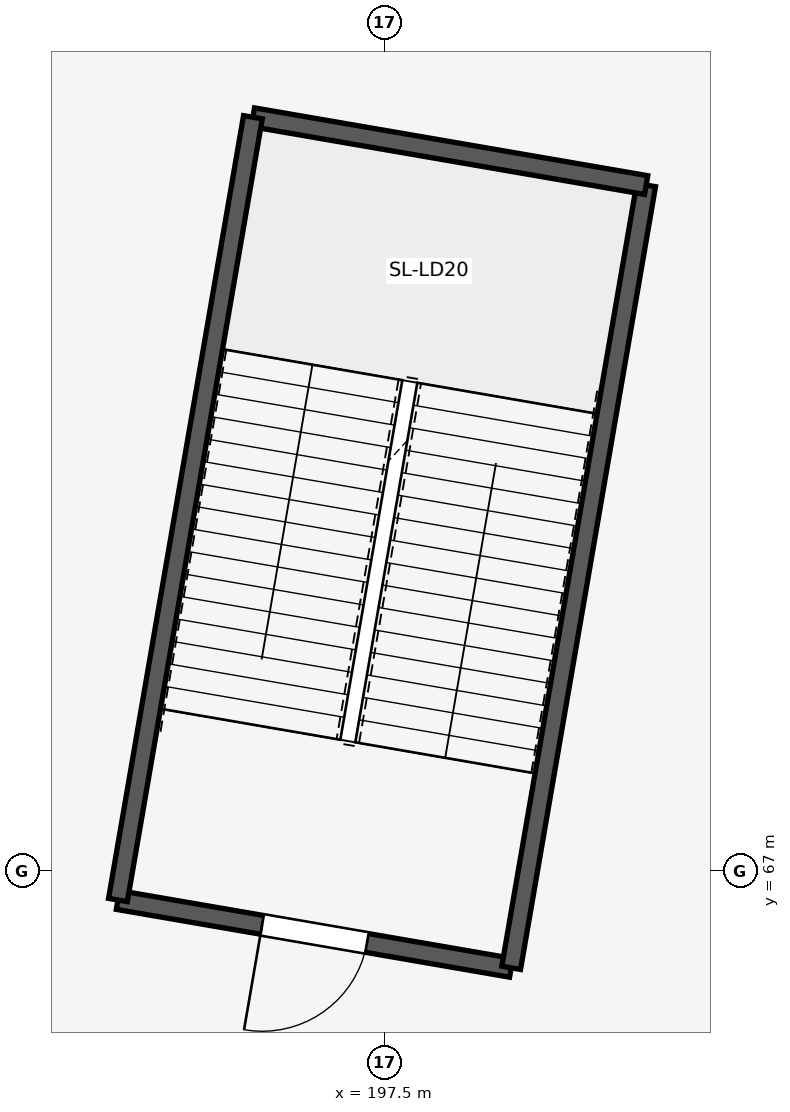
"""IFC4 building model, lengths in metres.
Left out: names, types, materials, properties, quantities, classifications, styles, units other than length and angle.
Written with IfcOpenShell. Run it as: python <this file> out.ifc"""

import sys

from ifc_helpers import new_model, si_unit, direction, frame, frame_2d, origin, place, context, subcontext, project, spatial, rectangle, extrude, element, fill, save


model = new_model("IFC4")
c1 = context("Model", 3, precision=1e-05, world=origin(), true_north=direction((0.0, 1.0)))
c2 = subcontext(c1, "Body", "Model", "MODEL_VIEW")
j1 = project(units=[si_unit("LENGTHUNIT", "METRE"), si_unit("PLANEANGLEUNIT", "RADIAN")], contexts=[c1])
p1 = place(None, origin())
s1 = spatial("IfcSite", under=j1, at=p1, CompositionType="ELEMENT")
p2 = place(p1, origin())
s2 = spatial("IfcBuilding", under=s1, at=p2, CompositionType="ELEMENT")
p3 = place(p2, origin())
s3 = spatial("IfcBuildingStorey", under=s2, at=p3, CompositionType="ELEMENT", Elevation=0.0)
p4 = place(p3, frame((193.987, 66.625, 0.0), z_axis=(0.0, 0.0, 1.0), x_axis=(0.985457162135, -0.16992404655, 0.0)))
e1 = element("IfcWall", 1, at=p4, inside=s3, PredefinedType="SHEAR", context=c2, shape_type="SweptSolid", body=[
    extrude(rectangle(XDim=5.25, YDim=0.25, at=frame_2d((2.625, 0.0))), origin(), (0.0, 0.0, 1.0), 4.94),
])
p5 = place(p4, frame((1.925, 0.0, 0.0)))
e2 = element("IfcOpeningElement", 2, at=p5, cuts=e1, PredefinedType="OPENING", context=c2, shape_type="SweptSolid", body=[
    extrude(rectangle(XDim=1.4, YDim=2.2, at=frame_2d((0.7, 1.1))), frame((0.0, 0.135, 0.0), z_axis=(0.0, -1.0, 0.0), x_axis=(1.0, 0.0, 0.0)), (0.0, 0.0, 1.0), 0.27),
])
p6 = place(p3, frame((199.16, 65.733, 0.0), z_axis=(0.0, 0.0, 1.0), x_axis=(0.169938992676, 0.985454584833, 0.0)))
e3 = element("IfcWall", 3, at=p6, inside=s3, PredefinedType="SHEAR", context=c2, shape_type="SweptSolid", body=[
    extrude(rectangle(XDim=10.45, YDim=0.25, at=frame_2d((5.225, 0.0))), origin(), (0.0, 0.0, 1.0), 4.94),
])
p7 = place(p3, frame((200.936, 76.031, 0.0), z_axis=(0.0, 0.0, 1.0), x_axis=(-0.985458504796, 0.169916259745, 0.0)))
e4 = element("IfcWall", 4, at=p7, inside=s3, PredefinedType="SHEAR", context=c2, shape_type="SweptSolid", body=[
    extrude(rectangle(XDim=5.25, YDim=0.25, at=frame_2d((2.625, 0.0))), origin(), (0.0, 0.0, 1.0), 4.94),
])
p8 = place(p3, frame((195.762, 76.923, 0.0), z_axis=(0.0, 0.0, 1.0), x_axis=(-0.16991630471, -0.985458497043, 0.0)))
e5 = element("IfcWall", 5, at=p8, inside=s3, PredefinedType="SHEAR", context=c2, shape_type="SweptSolid", body=[
    extrude(rectangle(XDim=10.45, YDim=0.25, at=frame_2d((5.225, 0.0))), origin(), (0.0, 0.0, 1.0), 4.94),
])
p9 = place(p5, frame((1.4, 0.0, 0.0), z_axis=(0.0, 0.0, 1.0), x_axis=(-1.0, 0.0, 0.0)))
e6 = element("IfcDoor", 6, at=p9, inside=s3, OperationType="SINGLE_SWING_RIGHT", PredefinedType="DOOR", context=c2, shape_type="SweptSolid", body=[
    extrude(rectangle(XDim=1.4, YDim=2.2, at=frame_2d((0.7, 1.1))), frame((0.0, 0.025, 0.0), z_axis=(0.0, -1.0, 0.0), x_axis=(1.0, 0.0, 0.0)), (0.0, 0.0, 1.0), 0.05),
])
fill(e2, e6)
save(model, sys.argv[1])
